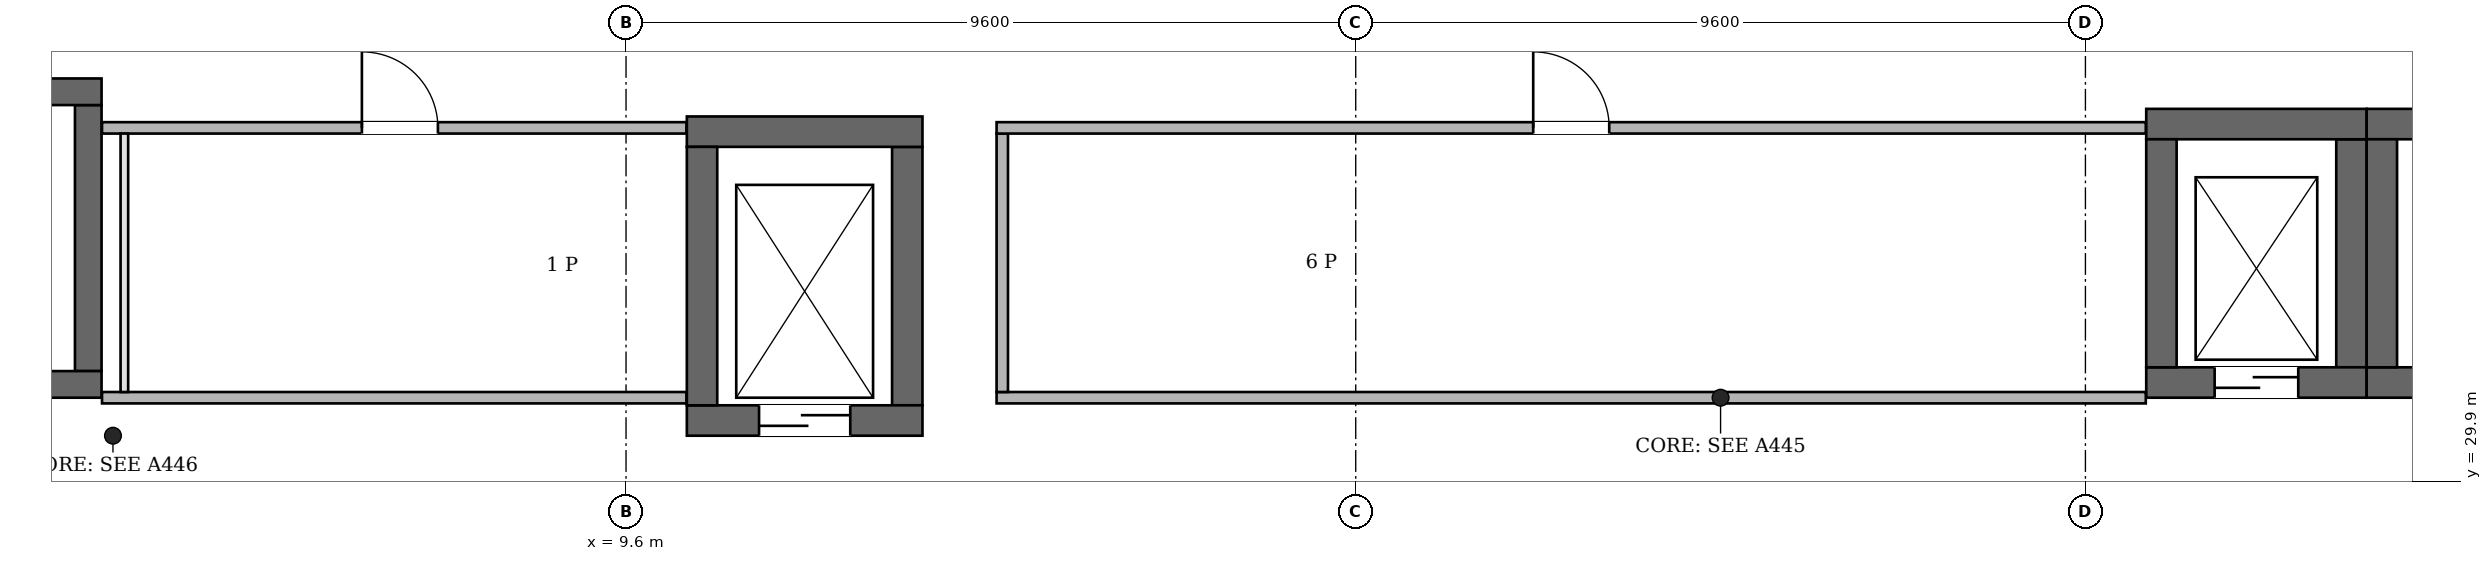
"""IFC4 building model, lengths in metres.
Left out: names, types, materials, properties, quantities, classifications, styles, units other than length and angle.
Written with IfcOpenShell. Run it as: python <this file> out.ifc"""

import sys

from ifc_helpers import new_model, si_unit, direction, frame, frame_2d, origin, place, context, subcontext, project, spatial, rectangle, extrude, element, fill, save


model = new_model("IFC4")
c1 = context("Model", 3, precision=1e-05, world=origin(), true_north=direction((0.0, 1.0)))
c2 = subcontext(c1, "Body", "Model", "MODEL_VIEW")
j1 = project(units=[si_unit("LENGTHUNIT", "METRE"), si_unit("PLANEANGLEUNIT", "RADIAN")], contexts=[c1])
p1 = place(None, origin())
s1 = spatial("IfcSite", under=j1, at=p1, CompositionType="ELEMENT")
p2 = place(p1, origin())
s2 = spatial("IfcBuilding", under=s1, at=p2, CompositionType="ELEMENT")
p3 = place(p2, origin())
s3 = spatial("IfcBuildingStorey", under=s2, at=p3, CompositionType="ELEMENT", Elevation=0.0)
for number, where, z_axis, x_axis in (
    (1, (0.2, 31.175, 0.0), (0.0, 0.0, 1.0), (1.0, 0.0, 0.0)),
    (2, (0.2, 35.025, 0.0), (0.0, 0.0, 1.0), (1.0, 0.0, 0.0)),
):
    element("IfcWall", number, at=place(p3, frame(where, z_axis=z_axis, x_axis=x_axis)), inside=s3, PredefinedType="SHEAR", context=c2, shape_type="SweptSolid", body=[
        extrude(rectangle(XDim=2.5, YDim=0.35, at=frame_2d((1.25, 0.0))), origin(), (0.0, 0.0, 1.0), 6.5),
    ])
p4 = place(p3, frame((2.525, 31.35, 0.0), z_axis=(0.0, 0.0, 1.0), x_axis=(0.0, 1.0, 0.0)))
e3 = element("IfcWall", 3, at=p4, inside=s3, PredefinedType="SHEAR", context=c2, shape_type="SweptSolid", body=[
    extrude(rectangle(XDim=3.5, YDim=0.35, at=frame_2d((1.75, 0.0))), origin(), (0.0, 0.0, 1.0), 6.5),
])
p5 = place(p3, frame((10.4, 30.7, 0.0), z_axis=(0.0, 0.0, 1.0), x_axis=(1.0, 0.0, 0.0)))
e4 = element("IfcWall", 4, at=p5, inside=s3, PredefinedType="SHEAR", context=c2, shape_type="SweptSolid", body=[
    extrude(rectangle(XDim=3.1, YDim=0.4, at=frame_2d((1.55, 0.0))), origin(), (0.0, 0.0, 1.0), 6.5),
])
p6 = place(p5, frame((0.95, 0.0, 0.0)))
e5 = element("IfcOpeningElement", 5, at=p6, cuts=e4, PredefinedType="OPENING", context=c2, shape_type="SweptSolid", body=[
    extrude(rectangle(XDim=1.2, YDim=2.1, at=frame_2d((0.6, 1.05))), frame((0.0, 0.21, 0.0), z_axis=(0.0, -1.0, 0.0), x_axis=(1.0, 0.0, 0.0)), (0.0, 0.0, 1.0), 0.42),
])
p7 = place(p3, frame((10.4, 34.5, 0.0), z_axis=(0.0, 0.0, 1.0), x_axis=(1.0, 0.0, 0.0)))
e6 = element("IfcWall", 6, at=p7, inside=s3, PredefinedType="SHEAR", context=c2, shape_type="SweptSolid", body=[
    extrude(rectangle(XDim=3.1, YDim=0.4, at=frame_2d((1.55, 0.0))), origin(), (0.0, 0.0, 1.0), 6.5),
])
for number, where, z_axis, x_axis in (
    (7, (10.6, 30.9, 0.0), (0.0, 0.0, 1.0), (0.0, 1.0, 0.0)),
    (8, (13.3, 30.9, 0.0), (0.0, 0.0, 1.0), (0.0, 1.0, 0.0)),
):
    element("IfcWall", number, at=place(p3, frame(where, z_axis=z_axis, x_axis=x_axis)), inside=s3, PredefinedType="SHEAR", context=c2, shape_type="SweptSolid", body=[
        extrude(rectangle(XDim=3.4, YDim=0.4, at=frame_2d((1.7, 0.0))), origin(), (0.0, 0.0, 1.0), 6.5),
    ])
p8 = place(p3, frame((29.6, 31.2, 0.0), z_axis=(0.0, 0.0, 1.0), x_axis=(1.0, 0.0, 0.0)))
e9 = element("IfcWall", 9, at=p8, inside=s3, PredefinedType="SHEAR", context=c2, shape_type="SweptSolid", body=[
    extrude(rectangle(XDim=2.9, YDim=0.4, at=frame_2d((1.45, 0.0))), origin(), (0.0, 0.0, 1.0), 6.5),
])
p9 = place(p8, frame((0.9, 0.0, 0.0)))
e10 = element("IfcOpeningElement", 10, at=p9, cuts=e9, PredefinedType="OPENING", context=c2, shape_type="SweptSolid", body=[
    extrude(rectangle(XDim=1.1, YDim=2.1, at=frame_2d((0.55, 1.05))), frame((0.0, 0.21, 0.0), z_axis=(0.0, -1.0, 0.0), x_axis=(1.0, 0.0, 0.0)), (0.0, 0.0, 1.0), 0.42),
])
p10 = place(p3, frame((29.6, 34.6, 0.0), z_axis=(0.0, 0.0, 1.0), x_axis=(1.0, 0.0, 0.0)))
e11 = element("IfcWall", 11, at=p10, inside=s3, PredefinedType="SHEAR", context=c2, shape_type="SweptSolid", body=[
    extrude(rectangle(XDim=2.9, YDim=0.4, at=frame_2d((1.45, 0.0))), origin(), (0.0, 0.0, 1.0), 6.5),
])
for number, where, z_axis, x_axis in (
    (12, (29.8, 31.4, 0.0), (0.0, 0.0, 1.0), (0.0, 1.0, 0.0)),
    (13, (32.3, 31.4, 0.0), (0.0, 0.0, 1.0), (0.0, 1.0, 0.0)),
):
    element("IfcWall", number, at=place(p3, frame(where, z_axis=z_axis, x_axis=x_axis)), inside=s3, PredefinedType="SHEAR", context=c2, shape_type="SweptSolid", body=[
        extrude(rectangle(XDim=3.0, YDim=0.4, at=frame_2d((1.5, 0.0))), origin(), (0.0, 0.0, 1.0), 6.5),
    ])
p11 = place(p3, frame((32.5, 31.2, 0.0), z_axis=(0.0, 0.0, 1.0), x_axis=(1.0, 0.0, 0.0)))
e14 = element("IfcWall", 14, at=p11, inside=s3, PredefinedType="SHEAR", context=c2, shape_type="SweptSolid", body=[
    extrude(rectangle(XDim=2.9, YDim=0.4, at=frame_2d((1.45, 0.0))), origin(), (0.0, 0.0, 1.0), 6.5),
])
p12 = place(p11, frame((0.9, 0.0, 0.0)))
e15 = element("IfcOpeningElement", 15, at=p12, cuts=e14, PredefinedType="OPENING", context=c2, shape_type="SweptSolid", body=[
    extrude(rectangle(XDim=1.1, YDim=2.1, at=frame_2d((0.55, 1.05))), frame((0.0, 0.21, 0.0), z_axis=(0.0, -1.0, 0.0), x_axis=(1.0, 0.0, 0.0)), (0.0, 0.0, 1.0), 0.42),
])
p13 = place(p3, frame((32.5, 34.6, 0.0), z_axis=(0.0, 0.0, 1.0), x_axis=(1.0, 0.0, 0.0)))
e16 = element("IfcWall", 16, at=p13, inside=s3, PredefinedType="SHEAR", context=c2, shape_type="SweptSolid", body=[
    extrude(rectangle(XDim=2.9, YDim=0.4, at=frame_2d((1.45, 0.0))), origin(), (0.0, 0.0, 1.0), 6.5),
])
p14 = place(p3, frame((32.7, 31.4, 0.0), z_axis=(0.0, 0.0, 1.0), x_axis=(0.0, 1.0, 0.0)))
e17 = element("IfcWall", 17, at=p14, inside=s3, PredefinedType="SHEAR", context=c2, shape_type="SweptSolid", body=[
    extrude(rectangle(XDim=3.0, YDim=0.4, at=frame_2d((1.5, 0.0))), origin(), (0.0, 0.0, 1.0), 6.5),
])
p15 = place(p3, frame((2.706, 31.0, 0.0), z_axis=(0.0, 0.0, 1.0), x_axis=(1.0, 0.0, 0.0)))
e18 = element("IfcWall", 18, at=p15, inside=s3, PredefinedType="PARTITIONING", context=c2, shape_type="SweptSolid", body=[
    extrude(rectangle(XDim=7.688, YDim=0.15, at=frame_2d((3.844, 0.0))), origin(), (0.0, 0.0, 1.0), 6.15),
])
p16 = place(p3, frame((2.706, 34.55, 0.0), z_axis=(0.0, 0.0, 1.0), x_axis=(1.0, 0.0, 0.0)))
e19 = element("IfcWall", 19, at=p16, inside=s3, PredefinedType="PARTITIONING", context=c2, shape_type="SweptSolid", body=[
    extrude(rectangle(XDim=7.688, YDim=0.15, at=frame_2d((3.844, 0.0))), origin(), (0.0, 0.0, 1.0), 6.15),
])
p17 = place(p16, frame((3.419, 0.0, 0.0)))
e20 = element("IfcOpeningElement", 20, at=p17, cuts=e19, PredefinedType="OPENING", context=c2, shape_type="SweptSolid", body=[
    extrude(rectangle(XDim=1.0, YDim=2.1, at=frame_2d((0.5, 1.05))), frame((0.0, 0.085, 0.0), z_axis=(0.0, -1.0, 0.0), x_axis=(1.0, 0.0, 0.0)), (0.0, 0.0, 1.0), 0.17),
])
p18 = place(p3, frame((3.0, 31.075, 0.0), z_axis=(0.0, 0.0, 1.0), x_axis=(0.0, 1.0, 0.0)))
e21 = element("IfcWall", 21, at=p18, inside=s3, PredefinedType="PARTITIONING", context=c2, shape_type="SweptSolid", body=[
    extrude(rectangle(XDim=3.4, YDim=0.1, at=frame_2d((1.7, 0.0))), origin(), (0.0, 0.0, 1.0), 6.15),
])
p19 = place(p3, frame((14.475, 31.0, 0.0), z_axis=(0.0, 0.0, 1.0), x_axis=(1.0, 0.0, 0.0)))
e22 = element("IfcWall", 22, at=p19, inside=s3, PredefinedType="PARTITIONING", context=c2, shape_type="SweptSolid", body=[
    extrude(rectangle(XDim=15.119, YDim=0.15, at=frame_2d((7.56, 0.0))), origin(), (0.0, 0.0, 1.0), 6.15),
])
p20 = place(p3, frame((14.55, 31.075, 0.0), z_axis=(0.0, 0.0, 1.0), x_axis=(0.0, 1.0, 0.0)))
e23 = element("IfcWall", 23, at=p20, inside=s3, PredefinedType="PARTITIONING", context=c2, shape_type="SweptSolid", body=[
    extrude(rectangle(XDim=3.4, YDim=0.15, at=frame_2d((1.7, 0.0))), origin(), (0.0, 0.0, 1.0), 6.15),
])
p21 = place(p3, frame((14.475, 34.55, 0.0), z_axis=(0.0, 0.0, 1.0), x_axis=(1.0, 0.0, 0.0)))
e24 = element("IfcWall", 24, at=p21, inside=s3, PredefinedType="PARTITIONING", context=c2, shape_type="SweptSolid", body=[
    extrude(rectangle(XDim=15.119, YDim=0.15, at=frame_2d((7.56, 0.0))), origin(), (0.0, 0.0, 1.0), 6.15),
])
p22 = place(p21, frame((7.06, 0.0, 0.0)))
e25 = element("IfcOpeningElement", 25, at=p22, cuts=e24, PredefinedType="OPENING", context=c2, shape_type="SweptSolid", body=[
    extrude(rectangle(XDim=1.0, YDim=2.1, at=frame_2d((0.5, 1.05))), frame((0.0, 0.085, 0.0), z_axis=(0.0, -1.0, 0.0), x_axis=(1.0, 0.0, 0.0)), (0.0, 0.0, 1.0), 0.17),
])
p23 = place(p6, origin())
e26 = element("IfcDoor", 26, at=p23, inside=s3, OperationType="DOUBLE_DOOR_SLIDING", PredefinedType="DOOR", context=c2, shape_type="SweptSolid", body=[
    extrude(rectangle(XDim=1.2, YDim=2.1, at=frame_2d((0.6, 1.05))), frame((0.0, 0.025, 0.0), z_axis=(0.0, -1.0, 0.0), x_axis=(1.0, 0.0, 0.0)), (0.0, 0.0, 1.0), 0.05),
])
fill(e5, e26)
p24 = place(p9, origin())
e27 = element("IfcDoor", 27, at=p24, inside=s3, OperationType="DOUBLE_DOOR_SLIDING", PredefinedType="DOOR", context=c2, shape_type="SweptSolid", body=[
    extrude(rectangle(XDim=1.1, YDim=2.1, at=frame_2d((0.55, 1.05))), frame((0.0, 0.025, 0.0), z_axis=(0.0, -1.0, 0.0), x_axis=(1.0, 0.0, 0.0)), (0.0, 0.0, 1.0), 0.05),
])
fill(e10, e27)
p25 = place(p22, origin())
e28 = element("IfcDoor", 28, at=p25, inside=s3, OperationType="SINGLE_SWING_LEFT", PredefinedType="DOOR", context=c2, shape_type="SweptSolid", body=[
    extrude(rectangle(XDim=1.0, YDim=2.1, at=frame_2d((0.5, 1.05))), frame((0.0, 0.025, 0.0), z_axis=(0.0, -1.0, 0.0), x_axis=(1.0, 0.0, 0.0)), (0.0, 0.0, 1.0), 0.05),
])
fill(e25, e28)
p26 = place(p17, origin())
e29 = element("IfcDoor", 29, at=p26, inside=s3, OperationType="SINGLE_SWING_LEFT", PredefinedType="DOOR", context=c2, shape_type="SweptSolid", body=[
    extrude(rectangle(XDim=1.0, YDim=2.1, at=frame_2d((0.5, 1.05))), frame((0.0, 0.025, 0.0), z_axis=(0.0, -1.0, 0.0), x_axis=(1.0, 0.0, 0.0)), (0.0, 0.0, 1.0), 0.05),
])
fill(e20, e29)
save(model, sys.argv[1])
